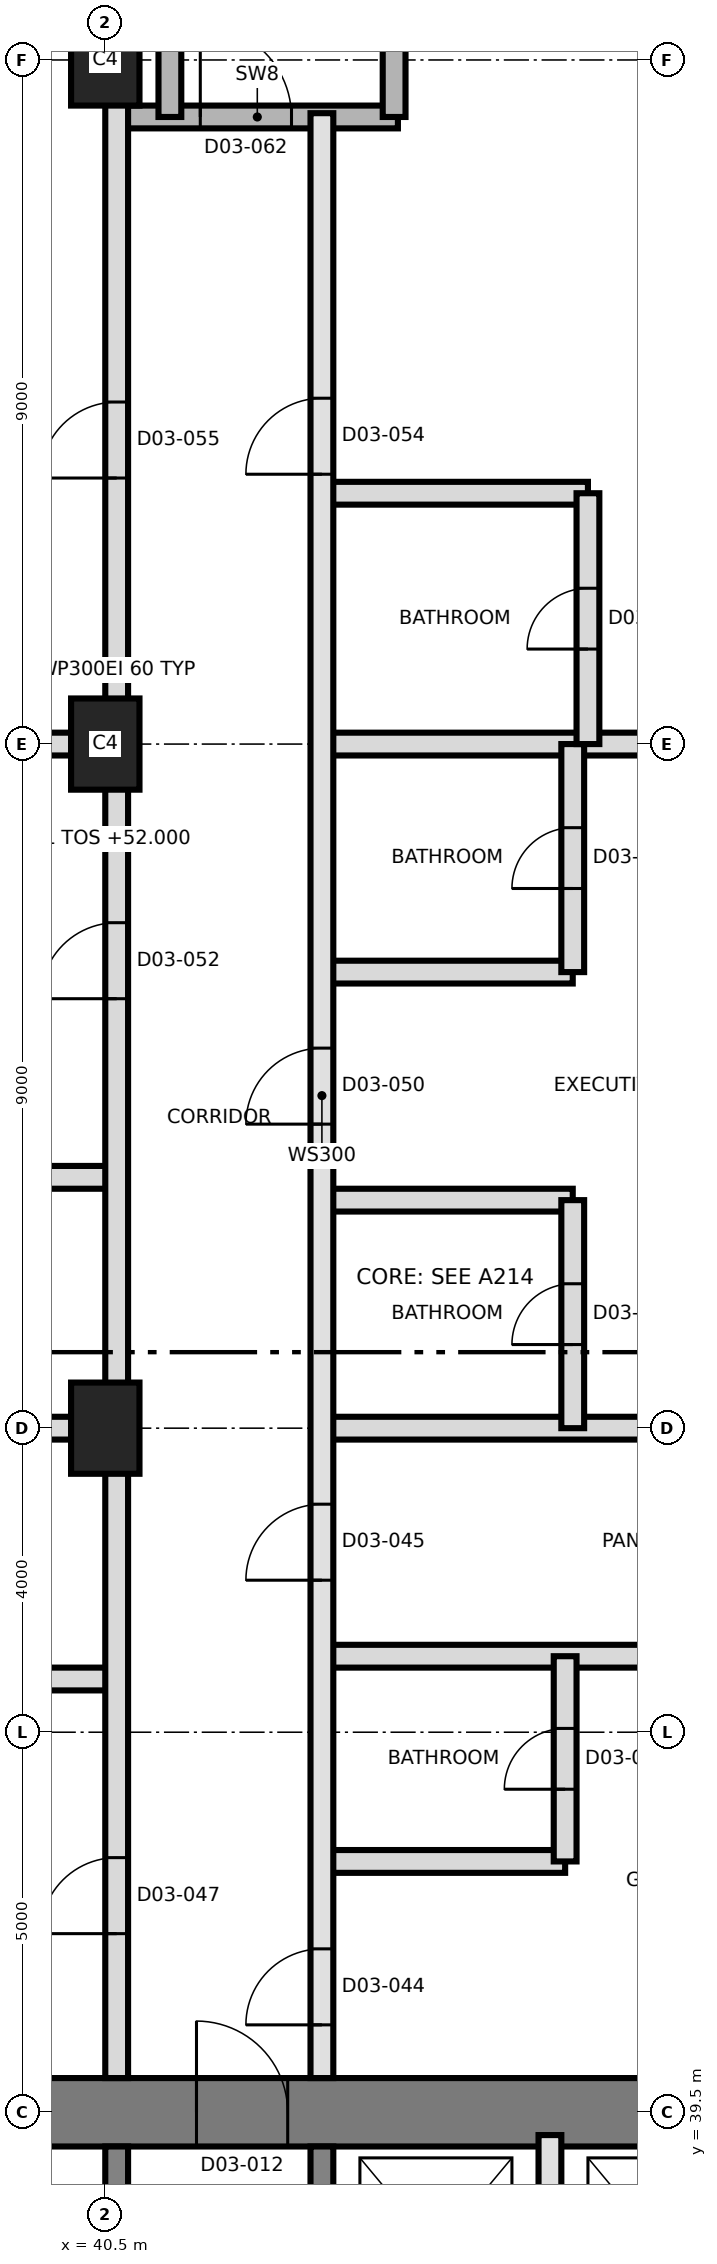
"""IFC4 building model, lengths in metres.
Left out: names, types, materials, properties, quantities, classifications, styles, units other than length and angle.
Written with IfcOpenShell. Run it as: python <this file> out.ifc"""

import sys

from ifc_helpers import new_model, si_unit, direction, frame, frame_2d, origin, origin_2d, place, context, subcontext, project, spatial, rectangle, extrude, element, fill, save


model = new_model("IFC4")
c1 = context("Model", 3, precision=1e-05, world=origin(), true_north=direction((0.0, 1.0)))
c2 = subcontext(c1, "Body", "Model", "MODEL_VIEW")
j1 = project(units=[si_unit("LENGTHUNIT", "METRE"), si_unit("PLANEANGLEUNIT", "RADIAN")], contexts=[c1])
p1 = place(None, origin())
s1 = spatial("IfcSite", under=j1, at=p1, CompositionType="ELEMENT")
p2 = place(p1, origin())
s2 = spatial("IfcBuilding", under=s1, at=p2, CompositionType="ELEMENT")
p3 = place(p2, frame((0.0, 0.0, 52.0)))
s3 = spatial("IfcBuildingStorey", under=s2, at=p3, CompositionType="ELEMENT", Elevation=52.0)
p4 = place(p3, frame((31.05, 39.5, 0.0), z_axis=(0.0, 0.0, 1.0), x_axis=(1.0, 0.0, 0.0)))
e1 = element("IfcWall", 1, at=p4, inside=s3, PredefinedType="SHEAR", context=c2, shape_type="SweptSolid", body=[
    extrude(rectangle(XDim=27.0, YDim=0.9, at=frame_2d((13.5, 0.0))), origin(), (0.0, 0.0, 1.0), 3.7),
])
p5 = place(p4, frame((10.65, 0.0, 0.0)))
e2 = element("IfcOpeningElement", 2, at=p5, cuts=e1, PredefinedType="OPENING", context=c2, shape_type="SweptSolid", body=[
    extrude(rectangle(XDim=1.2, YDim=2.1, at=frame_2d((0.6, 1.05))), frame((0.0, 0.46, 0.0), z_axis=(0.0, -1.0, 0.0), x_axis=(1.0, 0.0, 0.0)), (0.0, 0.0, 1.0), 0.92),
])
for number, where, z_axis, x_axis in (
    (3, (40.65, 33.5, 0.0), (0.0, 0.0, 1.0), (0.0, 1.0, 0.0)),
    (4, (43.35, 33.5, 0.0), (0.0, 0.0, 1.0), (0.0, 1.0, 0.0)),
):
    element("IfcWall", number, at=place(p3, frame(where, z_axis=z_axis, x_axis=x_axis)), inside=s3, PredefinedType="SHEAR", context=c2, shape_type="SweptSolid", body=[
        extrude(rectangle(XDim=5.55, YDim=0.3, at=frame_2d((2.775, 0.0))), origin(), (0.0, 0.0, 1.0), 3.7),
    ])
for number, where, z_axis, x_axis in (
    (5, (40.5, 48.5, 0.0), (0.0, 0.0, 1.0), (0.0, 1.0, 0.0)),
    (6, (40.5, 57.5, 0.0), (0.0, 0.0, 1.0), (0.0, 1.0, 0.0)),
    (7, (40.5, 66.5, 0.0), (0.0, 0.0, 1.0), (0.0, 1.0, 0.0)),
):
    element("IfcColumn", number, at=place(p3, frame(where, z_axis=z_axis, x_axis=x_axis)), inside=s3, PredefinedType="COLUMN", context=c2, shape_type="SweptSolid", body=[
        extrude(rectangle(XDim=1.2, YDim=0.9, at=origin_2d()), origin(), (0.0, 0.0, 1.0), 3.7),
    ])
p6 = place(p3, frame((46.35, 36.2, 0.0), z_axis=(0.0, 0.0, 1.0), x_axis=(0.0, 1.0, 0.0)))
e8 = element("IfcWall", 8, at=p6, inside=s3, PredefinedType="SOLIDWALL", context=c2, shape_type="SweptSolid", body=[
    extrude(rectangle(XDim=3.0, YDim=0.3, at=frame_2d((1.5, 0.0))), origin(), (0.0, 0.0, 1.0), 3.4),
])
p7 = place(p3, frame((43.35, 42.8, 0.0), z_axis=(0.0, 0.0, 1.0), x_axis=(1.0, 0.0, 0.0)))
e9 = element("IfcWall", 9, at=p7, inside=s3, PredefinedType="PARTITIONING", context=c2, shape_type="SweptSolid", body=[
    extrude(rectangle(XDim=3.2, YDim=0.3, at=frame_2d((1.6, 0.0))), origin(), (0.0, 0.0, 1.0), 3.4),
])
p8 = place(p3, frame((37.15, 45.2, 0.0), z_axis=(0.0, 0.0, 1.0), x_axis=(1.0, 0.0, 0.0)))
e10 = element("IfcWall", 10, at=p8, inside=s3, PredefinedType="PARTITIONING", context=c2, shape_type="SweptSolid", body=[
    extrude(rectangle(XDim=3.5, YDim=0.3, at=frame_2d((1.75, 0.0))), origin(), (0.0, 0.0, 1.0), 3.4),
])
p9 = place(p3, frame((43.35, 45.5, 0.0), z_axis=(0.0, 0.0, 1.0), x_axis=(1.0, 0.0, 0.0)))
e11 = element("IfcWall", 11, at=p9, inside=s3, PredefinedType="PARTITIONING", context=c2, shape_type="SweptSolid", body=[
    extrude(rectangle(XDim=8.125, YDim=0.3, at=frame_2d((4.062, 0.0))), origin(), (0.0, 0.0, 1.0), 3.4),
])
p10 = place(p3, frame((29.705, 48.5, 0.0), z_axis=(0.0, 0.0, 1.0), x_axis=(1.0, 0.0, 0.0)))
e12 = element("IfcWall", 12, at=p10, inside=s3, PredefinedType="PARTITIONING", context=c2, shape_type="SweptSolid", body=[
    extrude(rectangle(XDim=10.945, YDim=0.3, at=frame_2d((5.472, 0.0))), origin(), (0.0, 0.0, 1.0), 3.4),
])
p11 = place(p3, frame((43.35, 48.5, 0.0), z_axis=(0.0, 0.0, 1.0), x_axis=(1.0, 0.0, 0.0)))
e13 = element("IfcWall", 13, at=p11, inside=s3, PredefinedType="PARTITIONING", context=c2, shape_type="SweptSolid", body=[
    extrude(rectangle(XDim=8.125, YDim=0.3, at=frame_2d((4.062, 0.0))), origin(), (0.0, 0.0, 1.0), 3.4),
])
p12 = place(p3, frame((43.35, 51.5, 0.0), z_axis=(0.0, 0.0, 1.0), x_axis=(1.0, 0.0, 0.0)))
e14 = element("IfcWall", 14, at=p12, inside=s3, PredefinedType="PARTITIONING", context=c2, shape_type="SweptSolid", body=[
    extrude(rectangle(XDim=3.3, YDim=0.3, at=frame_2d((1.65, 0.0))), origin(), (0.0, 0.0, 1.0), 3.4),
])
p13 = place(p3, frame((37.15, 51.8, 0.0), z_axis=(0.0, 0.0, 1.0), x_axis=(1.0, 0.0, 0.0)))
e15 = element("IfcWall", 15, at=p13, inside=s3, PredefinedType="PARTITIONING", context=c2, shape_type="SweptSolid", body=[
    extrude(rectangle(XDim=3.5, YDim=0.3, at=frame_2d((1.75, 0.0))), origin(), (0.0, 0.0, 1.0), 3.4),
])
p14 = place(p3, frame((43.35, 54.5, 0.0), z_axis=(0.0, 0.0, 1.0), x_axis=(1.0, 0.0, 0.0)))
e16 = element("IfcWall", 16, at=p14, inside=s3, PredefinedType="PARTITIONING", context=c2, shape_type="SweptSolid", body=[
    extrude(rectangle(XDim=3.3, YDim=0.3, at=frame_2d((1.65, 0.0))), origin(), (0.0, 0.0, 1.0), 3.4),
])
p15 = place(p3, frame((29.705, 57.5, 0.0), z_axis=(0.0, 0.0, 1.0), x_axis=(1.0, 0.0, 0.0)))
e17 = element("IfcWall", 17, at=p15, inside=s3, PredefinedType="PARTITIONING", context=c2, shape_type="SweptSolid", body=[
    extrude(rectangle(XDim=10.945, YDim=0.3, at=frame_2d((5.472, 0.0))), origin(), (0.0, 0.0, 1.0), 3.4),
])
p16 = place(p3, frame((43.35, 57.5, 0.0), z_axis=(0.0, 0.0, 1.0), x_axis=(1.0, 0.0, 0.0)))
e18 = element("IfcWall", 18, at=p16, inside=s3, PredefinedType="PARTITIONING", context=c2, shape_type="SweptSolid", body=[
    extrude(rectangle(XDim=8.125, YDim=0.3, at=frame_2d((4.062, 0.0))), origin(), (0.0, 0.0, 1.0), 3.4),
])
p17 = place(p3, frame((43.35, 60.8, 0.0), z_axis=(0.0, 0.0, 1.0), x_axis=(1.0, 0.0, 0.0)))
e19 = element("IfcWall", 19, at=p17, inside=s3, PredefinedType="PARTITIONING", context=c2, shape_type="SweptSolid", body=[
    extrude(rectangle(XDim=3.5, YDim=0.3, at=frame_2d((1.75, 0.0))), origin(), (0.0, 0.0, 1.0), 3.4),
])
p18 = place(p3, frame((40.65, 65.75, 0.0), z_axis=(0.0, 0.0, 1.0), x_axis=(1.0, 0.0, 0.0)))
e20 = element("IfcWall", 20, at=p18, inside=s3, PredefinedType="SHEAR", context=c2, shape_type="SweptSolid", body=[
    extrude(rectangle(XDim=3.7, YDim=0.3, at=frame_2d((1.85, 0.0))), origin(), (0.0, 0.0, 1.0), 3.4),
])
p19 = place(p18, frame((1.1, 0.0, 0.0)))
e21 = element("IfcOpeningElement", 21, at=p19, cuts=e20, PredefinedType="OPENING", context=c2, shape_type="SweptSolid", body=[
    extrude(rectangle(XDim=1.2, YDim=2.1, at=frame_2d((0.6, 1.05))), frame((0.0, 0.16, 0.0), z_axis=(0.0, -1.0, 0.0), x_axis=(1.0, 0.0, 0.0)), (0.0, 0.0, 1.0), 0.32),
])
p20 = place(p3, frame((40.65, 39.95, 0.0), z_axis=(0.0, 0.0, 1.0), x_axis=(0.0, 1.0, 0.0)))
e22 = element("IfcWall", 22, at=p20, inside=s3, PredefinedType="PARTITIONING", context=c2, shape_type="SweptSolid", body=[
    extrude(rectangle(XDim=37.05, YDim=0.3, at=frame_2d((18.525, 0.0))), origin(), (0.0, 0.0, 1.0), 3.4),
])
p21 = place(p20, frame((1.9, 0.0, 0.0)))
e23 = element("IfcOpeningElement", 23, at=p21, cuts=e22, PredefinedType="OPENING", context=c2, shape_type="SweptSolid", body=[
    extrude(rectangle(XDim=1.0, YDim=2.4, at=frame_2d((0.5, 1.2))), frame((0.0, 0.16, 0.0), z_axis=(0.0, -1.0, 0.0), x_axis=(1.0, 0.0, 0.0)), (0.0, 0.0, 1.0), 0.32),
])
p22 = place(p20, frame((14.2, 0.0, 0.0)))
e24 = element("IfcOpeningElement", 24, at=p22, cuts=e22, PredefinedType="OPENING", context=c2, shape_type="SweptSolid", body=[
    extrude(rectangle(XDim=1.0, YDim=2.4, at=frame_2d((0.5, 1.2))), frame((0.0, 0.16, 0.0), z_axis=(0.0, -1.0, 0.0), x_axis=(1.0, 0.0, 0.0)), (0.0, 0.0, 1.0), 0.32),
])
p23 = place(p20, frame((21.05, 0.0, 0.0)))
e25 = element("IfcOpeningElement", 25, at=p23, cuts=e22, PredefinedType="OPENING", context=c2, shape_type="SweptSolid", body=[
    extrude(rectangle(XDim=1.0, YDim=2.4, at=frame_2d((0.5, 1.2))), frame((0.0, 0.16, 0.0), z_axis=(0.0, -1.0, 0.0), x_axis=(1.0, 0.0, 0.0)), (0.0, 0.0, 1.0), 0.32),
])
p24 = place(p3, frame((41.35, 65.75, 0.0), z_axis=(0.0, 0.0, 1.0), x_axis=(0.0, 1.0, 0.0)))
e26 = element("IfcWall", 26, at=p24, inside=s3, PredefinedType="SHEAR", context=c2, shape_type="SweptSolid", body=[
    extrude(rectangle(XDim=8.85, YDim=0.3, at=frame_2d((4.425, 0.0))), origin(), (0.0, 0.0, 1.0), 3.4),
])
p25 = place(p3, frame((43.35, 39.95, 0.0), z_axis=(0.0, 0.0, 1.0), x_axis=(0.0, 1.0, 0.0)))
e27 = element("IfcWall", 27, at=p25, inside=s3, PredefinedType="SOLIDWALL", context=c2, shape_type="SweptSolid", body=[
    extrude(rectangle(XDim=25.85, YDim=0.3, at=frame_2d((12.925, 0.0))), origin(), (0.0, 0.0, 1.0), 3.4),
])
p26 = place(p25, frame((0.7, 0.0, 0.0)))
e28 = element("IfcOpeningElement", 28, at=p26, cuts=e27, PredefinedType="OPENING", context=c2, shape_type="SweptSolid", body=[
    extrude(rectangle(XDim=1.0, YDim=2.1, at=frame_2d((0.5, 1.05))), frame((0.0, 0.16, 0.0), z_axis=(0.0, -1.0, 0.0), x_axis=(1.0, 0.0, 0.0)), (0.0, 0.0, 1.0), 0.32),
])
p27 = place(p25, frame((6.55, 0.0, 0.0)))
e29 = element("IfcOpeningElement", 29, at=p27, cuts=e27, PredefinedType="OPENING", context=c2, shape_type="SweptSolid", body=[
    extrude(rectangle(XDim=1.0, YDim=2.1, at=frame_2d((0.5, 1.05))), frame((0.0, 0.16, 0.0), z_axis=(0.0, -1.0, 0.0), x_axis=(1.0, 0.0, 0.0)), (0.0, 0.0, 1.0), 0.32),
])
p28 = place(p25, frame((12.55, 0.0, 0.0)))
e30 = element("IfcOpeningElement", 30, at=p28, cuts=e27, PredefinedType="OPENING", context=c2, shape_type="SweptSolid", body=[
    extrude(rectangle(XDim=1.0, YDim=2.4, at=frame_2d((0.5, 1.2))), frame((0.0, 0.16, 0.0), z_axis=(0.0, -1.0, 0.0), x_axis=(1.0, 0.0, 0.0)), (0.0, 0.0, 1.0), 0.32),
])
p29 = place(p25, frame((21.1, 0.0, 0.0)))
e31 = element("IfcOpeningElement", 31, at=p29, cuts=e27, PredefinedType="OPENING", context=c2, shape_type="SweptSolid", body=[
    extrude(rectangle(XDim=1.0, YDim=2.4, at=frame_2d((0.5, 1.2))), frame((0.0, 0.16, 0.0), z_axis=(0.0, -1.0, 0.0), x_axis=(1.0, 0.0, 0.0)), (0.0, 0.0, 1.0), 0.32),
])
p30 = place(p3, frame((44.3, 65.75, 0.0), z_axis=(0.0, 0.0, 1.0), x_axis=(0.0, 1.0, 0.0)))
e32 = element("IfcWall", 32, at=p30, inside=s3, PredefinedType="SHEAR", context=c2, shape_type="SweptSolid", body=[
    extrude(rectangle(XDim=8.85, YDim=0.3, at=frame_2d((4.425, 0.0))), origin(), (0.0, 0.0, 1.0), 3.4),
])
p31 = place(p3, frame((46.55, 42.8, 0.0), z_axis=(0.0, 0.0, 1.0), x_axis=(0.0, 1.0, 0.0)))
e33 = element("IfcWall", 33, at=p31, inside=s3, PredefinedType="PARTITIONING", context=c2, shape_type="SweptSolid", body=[
    extrude(rectangle(XDim=2.7, YDim=0.3, at=frame_2d((1.35, 0.0))), origin(), (0.0, 0.0, 1.0), 3.4),
])
p32 = place(p31, frame((0.95, 0.0, 0.0)))
e34 = element("IfcOpeningElement", 34, at=p32, cuts=e33, PredefinedType="OPENING", context=c2, shape_type="SweptSolid", body=[
    extrude(rectangle(XDim=0.8, YDim=2.1, at=frame_2d((0.4, 1.05))), frame((0.0, 0.16, 0.0), z_axis=(0.0, -1.0, 0.0), x_axis=(1.0, 0.0, 0.0)), (0.0, 0.0, 1.0), 0.32),
])
p33 = place(p3, frame((46.65, 48.5, 0.0), z_axis=(0.0, 0.0, 1.0), x_axis=(0.0, 1.0, 0.0)))
e35 = element("IfcWall", 35, at=p33, inside=s3, PredefinedType="PARTITIONING", context=c2, shape_type="SweptSolid", body=[
    extrude(rectangle(XDim=3.0, YDim=0.3, at=frame_2d((1.5, 0.0))), origin(), (0.0, 0.0, 1.0), 3.4),
])
p34 = place(p33, frame((1.1, 0.0, 0.0)))
e36 = element("IfcOpeningElement", 36, at=p34, cuts=e35, PredefinedType="OPENING", context=c2, shape_type="SweptSolid", body=[
    extrude(rectangle(XDim=0.8, YDim=2.1, at=frame_2d((0.4, 1.05))), frame((0.0, 0.16, 0.0), z_axis=(0.0, -1.0, 0.0), x_axis=(1.0, 0.0, 0.0)), (0.0, 0.0, 1.0), 0.32),
])
p35 = place(p3, frame((46.65, 54.5, 0.0), z_axis=(0.0, 0.0, 1.0), x_axis=(0.0, 1.0, 0.0)))
e37 = element("IfcWall", 37, at=p35, inside=s3, PredefinedType="PARTITIONING", context=c2, shape_type="SweptSolid", body=[
    extrude(rectangle(XDim=3.0, YDim=0.3, at=frame_2d((1.5, 0.0))), origin(), (0.0, 0.0, 1.0), 3.4),
])
p36 = place(p35, frame((1.1, 0.0, 0.0)))
e38 = element("IfcOpeningElement", 38, at=p36, cuts=e37, PredefinedType="OPENING", context=c2, shape_type="SweptSolid", body=[
    extrude(rectangle(XDim=0.8, YDim=2.1, at=frame_2d((0.4, 1.05))), frame((0.0, 0.16, 0.0), z_axis=(0.0, -1.0, 0.0), x_axis=(1.0, 0.0, 0.0)), (0.0, 0.0, 1.0), 0.32),
])
p37 = place(p3, frame((46.85, 57.5, 0.0), z_axis=(0.0, 0.0, 1.0), x_axis=(0.0, 1.0, 0.0)))
e39 = element("IfcWall", 39, at=p37, inside=s3, PredefinedType="PARTITIONING", context=c2, shape_type="SweptSolid", body=[
    extrude(rectangle(XDim=3.3, YDim=0.3, at=frame_2d((1.65, 0.0))), origin(), (0.0, 0.0, 1.0), 3.4),
])
p38 = place(p37, frame((1.25, 0.0, 0.0)))
e40 = element("IfcOpeningElement", 40, at=p38, cuts=e39, PredefinedType="OPENING", context=c2, shape_type="SweptSolid", body=[
    extrude(rectangle(XDim=0.8, YDim=2.1, at=frame_2d((0.4, 1.05))), frame((0.0, 0.16, 0.0), z_axis=(0.0, -1.0, 0.0), x_axis=(1.0, 0.0, 0.0)), (0.0, 0.0, 1.0), 0.32),
])
p39 = place(p5, origin())
e41 = element("IfcDoor", 41, at=p39, inside=s3, OperationType="SINGLE_SWING_RIGHT", PredefinedType="DOOR", context=c2, shape_type="SweptSolid", body=[
    extrude(rectangle(XDim=1.2, YDim=2.1, at=frame_2d((0.6, 1.05))), frame((0.0, 0.025, 0.0), z_axis=(0.0, -1.0, 0.0), x_axis=(1.0, 0.0, 0.0)), (0.0, 0.0, 1.0), 0.05),
])
fill(e2, e41)
p40 = place(p32, origin())
e42 = element("IfcDoor", 42, at=p40, inside=s3, OperationType="SINGLE_SWING_LEFT", PredefinedType="DOOR", context=c2, shape_type="SweptSolid", body=[
    extrude(rectangle(XDim=0.8, YDim=2.1, at=frame_2d((0.4, 1.05))), frame((0.0, 0.025, 0.0), z_axis=(0.0, -1.0, 0.0), x_axis=(1.0, 0.0, 0.0)), (0.0, 0.0, 1.0), 0.05),
])
fill(e34, e42)
p41 = place(p26, origin())
e43 = element("IfcDoor", 43, at=p41, inside=s3, OperationType="SINGLE_SWING_RIGHT", PredefinedType="DOOR", context=c2, shape_type="SweptSolid", body=[
    extrude(rectangle(XDim=1.0, YDim=2.1, at=frame_2d((0.5, 1.05))), frame((0.0, 0.025, 0.0), z_axis=(0.0, -1.0, 0.0), x_axis=(1.0, 0.0, 0.0)), (0.0, 0.0, 1.0), 0.05),
])
fill(e28, e43)
p42 = place(p27, origin())
e44 = element("IfcDoor", 44, at=p42, inside=s3, OperationType="SINGLE_SWING_LEFT", PredefinedType="DOOR", context=c2, shape_type="SweptSolid", body=[
    extrude(rectangle(XDim=1.0, YDim=2.1, at=frame_2d((0.5, 1.05))), frame((0.0, 0.025, 0.0), z_axis=(0.0, -1.0, 0.0), x_axis=(1.0, 0.0, 0.0)), (0.0, 0.0, 1.0), 0.05),
])
fill(e29, e44)
p43 = place(p21, origin())
e45 = element("IfcDoor", 45, at=p43, inside=s3, OperationType="SINGLE_SWING_RIGHT", PredefinedType="DOOR", context=c2, shape_type="SweptSolid", body=[
    extrude(rectangle(XDim=1.0, YDim=2.4, at=frame_2d((0.5, 1.2))), frame((0.0, 0.025, 0.0), z_axis=(0.0, -1.0, 0.0), x_axis=(1.0, 0.0, 0.0)), (0.0, 0.0, 1.0), 0.05),
])
fill(e23, e45)
p44 = place(p34, origin())
e46 = element("IfcDoor", 46, at=p44, inside=s3, OperationType="SINGLE_SWING_RIGHT", PredefinedType="DOOR", context=c2, shape_type="SweptSolid", body=[
    extrude(rectangle(XDim=0.8, YDim=2.1, at=frame_2d((0.4, 1.05))), frame((0.0, 0.025, 0.0), z_axis=(0.0, -1.0, 0.0), x_axis=(1.0, 0.0, 0.0)), (0.0, 0.0, 1.0), 0.05),
])
fill(e36, e46)
p45 = place(p36, origin())
e47 = element("IfcDoor", 47, at=p45, inside=s3, OperationType="SINGLE_SWING_LEFT", PredefinedType="DOOR", context=c2, shape_type="SweptSolid", body=[
    extrude(rectangle(XDim=0.8, YDim=2.1, at=frame_2d((0.4, 1.05))), frame((0.0, 0.025, 0.0), z_axis=(0.0, -1.0, 0.0), x_axis=(1.0, 0.0, 0.0)), (0.0, 0.0, 1.0), 0.05),
])
fill(e38, e47)
p46 = place(p28, origin())
e48 = element("IfcDoor", 48, at=p46, inside=s3, OperationType="SINGLE_SWING_LEFT", PredefinedType="DOOR", context=c2, shape_type="SweptSolid", body=[
    extrude(rectangle(XDim=1.0, YDim=2.4, at=frame_2d((0.5, 1.2))), frame((0.0, 0.025, 0.0), z_axis=(0.0, -1.0, 0.0), x_axis=(1.0, 0.0, 0.0)), (0.0, 0.0, 1.0), 0.05),
])
fill(e30, e48)
p47 = place(p22, origin())
e49 = element("IfcDoor", 49, at=p47, inside=s3, OperationType="SINGLE_SWING_LEFT", PredefinedType="DOOR", context=c2, shape_type="SweptSolid", body=[
    extrude(rectangle(XDim=1.0, YDim=2.4, at=frame_2d((0.5, 1.2))), frame((0.0, 0.025, 0.0), z_axis=(0.0, -1.0, 0.0), x_axis=(1.0, 0.0, 0.0)), (0.0, 0.0, 1.0), 0.05),
])
fill(e24, e49)
p48 = place(p38, origin())
e50 = element("IfcDoor", 50, at=p48, inside=s3, OperationType="SINGLE_SWING_LEFT", PredefinedType="DOOR", context=c2, shape_type="SweptSolid", body=[
    extrude(rectangle(XDim=0.8, YDim=2.1, at=frame_2d((0.4, 1.05))), frame((0.0, 0.025, 0.0), z_axis=(0.0, -1.0, 0.0), x_axis=(1.0, 0.0, 0.0)), (0.0, 0.0, 1.0), 0.05),
])
fill(e40, e50)
p49 = place(p29, origin())
e51 = element("IfcDoor", 51, at=p49, inside=s3, OperationType="SINGLE_SWING_LEFT", PredefinedType="DOOR", context=c2, shape_type="SweptSolid", body=[
    extrude(rectangle(XDim=1.0, YDim=2.4, at=frame_2d((0.5, 1.2))), frame((0.0, 0.025, 0.0), z_axis=(0.0, -1.0, 0.0), x_axis=(1.0, 0.0, 0.0)), (0.0, 0.0, 1.0), 0.05),
])
fill(e31, e51)
p50 = place(p23, origin())
e52 = element("IfcDoor", 52, at=p50, inside=s3, OperationType="SINGLE_SWING_RIGHT", PredefinedType="DOOR", context=c2, shape_type="SweptSolid", body=[
    extrude(rectangle(XDim=1.0, YDim=2.4, at=frame_2d((0.5, 1.2))), frame((0.0, 0.025, 0.0), z_axis=(0.0, -1.0, 0.0), x_axis=(1.0, 0.0, 0.0)), (0.0, 0.0, 1.0), 0.05),
])
fill(e25, e52)
p51 = place(p19, origin())
e53 = element("IfcDoor", 53, at=p51, inside=s3, OperationType="SINGLE_SWING_RIGHT", PredefinedType="DOOR", context=c2, shape_type="SweptSolid", body=[
    extrude(rectangle(XDim=1.2, YDim=2.1, at=frame_2d((0.6, 1.05))), frame((0.0, 0.025, 0.0), z_axis=(0.0, -1.0, 0.0), x_axis=(1.0, 0.0, 0.0)), (0.0, 0.0, 1.0), 0.05),
])
fill(e21, e53)
save(model, sys.argv[1])
